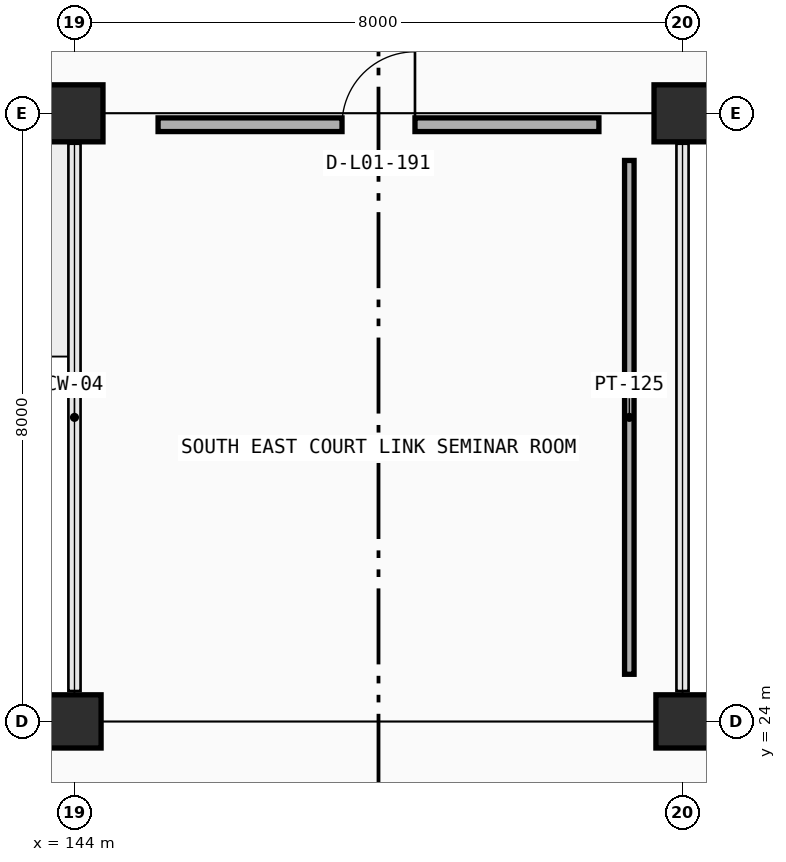
"""IFC4 building model, lengths in metres.
Left out: names, types, materials, properties, quantities, classifications, styles, units other than length and angle.
Written with IfcOpenShell. Run it as: python <this file> out.ifc"""

import sys

from ifc_helpers import new_model, si_unit, direction, frame, frame_2d, origin, origin_2d, place, context, subcontext, project, spatial, rectangle, extrude, element, fill, save


model = new_model("IFC4")
c1 = context("Model", 3, precision=1e-05, world=origin(), true_north=direction((0.0, 1.0)))
c2 = subcontext(c1, "Body", "Model", "MODEL_VIEW")
j1 = project(units=[si_unit("LENGTHUNIT", "METRE"), si_unit("PLANEANGLEUNIT", "RADIAN")], contexts=[c1])
p1 = place(None, origin())
s1 = spatial("IfcSite", under=j1, at=p1, CompositionType="ELEMENT")
p2 = place(p1, origin())
s2 = spatial("IfcBuilding", under=s1, at=p2, CompositionType="ELEMENT")
p3 = place(p2, origin())
s3 = spatial("IfcBuildingStorey", under=s2, at=p3, CompositionType="ELEMENT", Elevation=0.0)
for number, where, z_axis, x_axis in (
    (1, (144.0, 24.0, 0.0), (0.0, 0.0, 1.0), (1.0, 0.0, 0.0)),
    (2, (152.0, 24.0, 0.0), (0.0, 0.0, 1.0), (1.0, 0.0, 0.0)),
):
    element("IfcColumn", number, at=place(p3, frame(where, z_axis=z_axis, x_axis=x_axis)), inside=s3, PredefinedType="COLUMN", context=c2, shape_type="SweptSolid", body=[
        extrude(rectangle(XDim=0.7, YDim=0.7, at=origin_2d()), origin(), (0.0, 0.0, 1.0), 4.8),
    ])
for number, where, z_axis, x_axis in (
    (3, (144.0, 32.0, 0.0), (0.0, 0.0, 1.0), (1.0, 0.0, 0.0)),
    (4, (152.0, 32.0, 0.0), (0.0, 0.0, 1.0), (1.0, 0.0, 0.0)),
):
    element("IfcColumn", number, at=place(p3, frame(where, z_axis=z_axis, x_axis=x_axis)), inside=s3, PredefinedType="COLUMN", context=c2, shape_type="SweptSolid", body=[
        extrude(rectangle(XDim=0.75, YDim=0.75, at=origin_2d()), origin(), (0.0, 0.0, 1.0), 4.8),
    ])
p4 = place(p3, frame((145.1, 31.85, 0.0), z_axis=(0.0, 0.0, 1.0), x_axis=(1.0, 0.0, 0.0)))
e5 = element("IfcWall", 5, at=p4, inside=s3, PredefinedType="PARTITIONING", context=c2, shape_type="SweptSolid", body=[
    extrude(rectangle(XDim=5.8, YDim=0.18, at=frame_2d((2.9, 0.0))), origin(), (0.0, 0.0, 1.0), 3.9),
])
p5 = place(p4, frame((2.42, 0.0, 0.0)))
e6 = element("IfcOpeningElement", 6, at=p5, cuts=e5, PredefinedType="OPENING", context=c2, shape_type="SweptSolid", body=[
    extrude(rectangle(XDim=0.96, YDim=2.15, at=frame_2d((0.48, 1.075))), frame((0.0, 0.1, 0.0), z_axis=(0.0, -1.0, 0.0), x_axis=(1.0, 0.0, 0.0)), (0.0, 0.0, 1.0), 0.2),
])
p6 = place(p3, frame((151.3, 24.62, 0.0), z_axis=(0.0, 0.0, 1.0), x_axis=(0.0, 1.0, 0.0)))
e7 = element("IfcWall", 7, at=p6, inside=s3, PredefinedType="PARTITIONING", context=c2, shape_type="SweptSolid", body=[
    extrude(rectangle(XDim=6.76, YDim=0.125, at=frame_2d((3.38, 0.0))), origin(), (0.0, 0.0, 1.0), 3.9),
])
p7 = place(p5, origin())
e8 = element("IfcDoor", 8, at=p7, inside=s3, OperationType="SINGLE_SWING_RIGHT", PredefinedType="DOOR", context=c2, shape_type="SweptSolid", body=[
    extrude(rectangle(XDim=0.96, YDim=2.15, at=frame_2d((0.48, 1.075))), frame((0.0, 0.025, 0.0), z_axis=(0.0, -1.0, 0.0), x_axis=(1.0, 0.0, 0.0)), (0.0, 0.0, 1.0), 0.05),
])
fill(e6, e8)
save(model, sys.argv[1])
